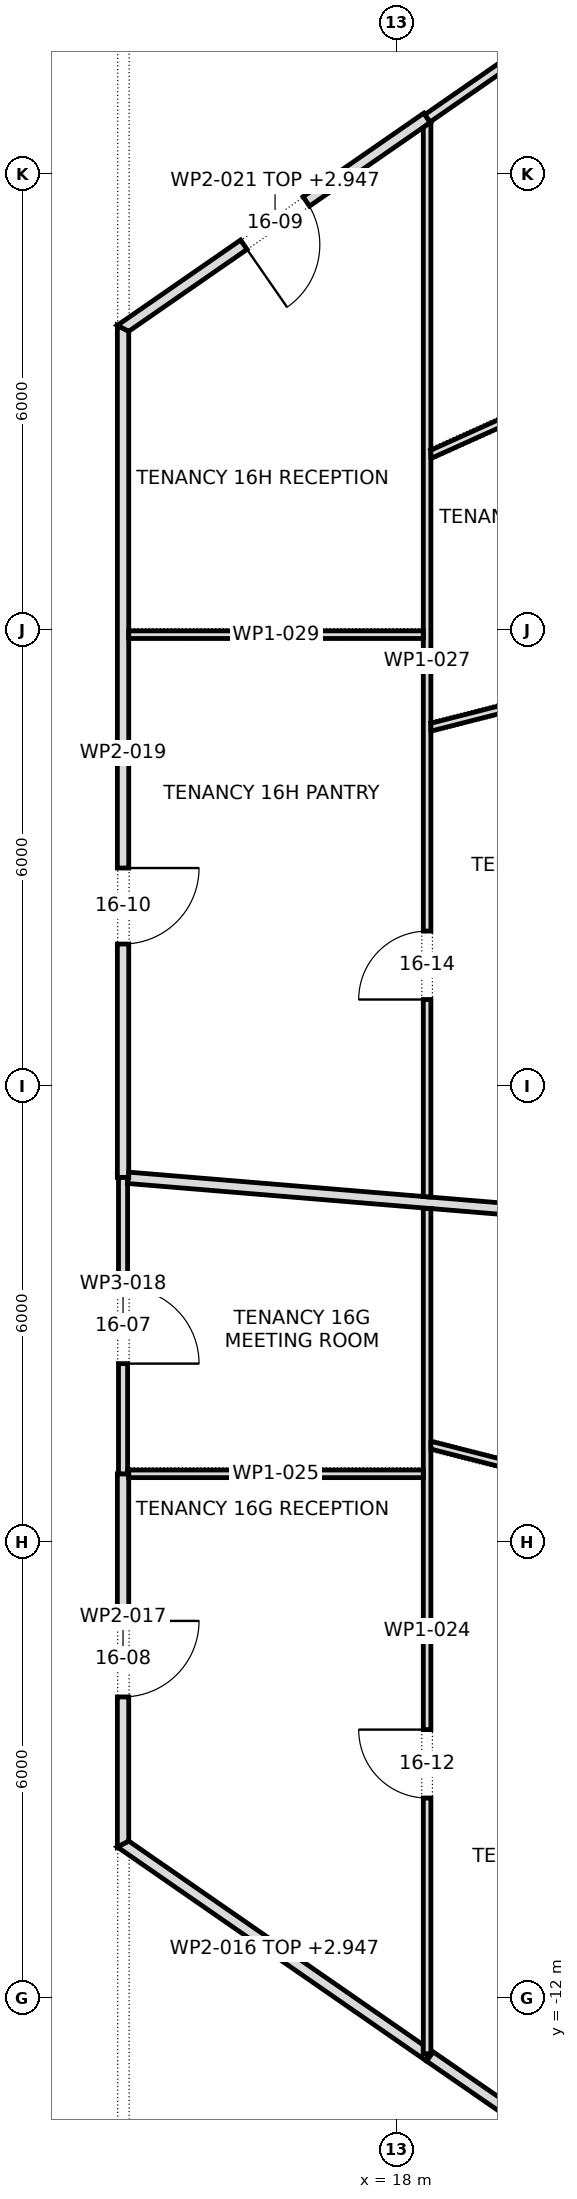
"""IFC4 building model, lengths in metres.
Left out: names, types, materials, properties, quantities, classifications, styles, units other than length and angle.
Written with IfcOpenShell. Run it as: python <this file> out.ifc"""

import sys

from ifc_helpers import new_model, si_unit, direction, frame, frame_2d, origin, place, context, subcontext, project, spatial, polyline, rectangle, outline, extrude, element, fill, save


model = new_model("IFC4")
c1 = context("Model", 3, precision=1e-05, world=origin(), true_north=direction((0.0, 1.0)))
c2 = subcontext(c1, "Body", "Model", "MODEL_VIEW")
j1 = project(units=[si_unit("LENGTHUNIT", "METRE"), si_unit("PLANEANGLEUNIT", "RADIAN")], contexts=[c1])
p1 = place(None, origin())
s1 = spatial("IfcSite", under=j1, at=p1, CompositionType="ELEMENT")
p2 = place(p1, origin())
s2 = spatial("IfcBuilding", under=s1, at=p2, CompositionType="ELEMENT")
p3 = place(p2, frame((0.0, 0.0, 226.9)))
s3 = spatial("IfcBuildingStorey", under=s2, at=p3, CompositionType="ELEMENT", Elevation=226.9)
p4 = place(p3, frame((14.368, -9.948, 0.0), z_axis=(0.0, 0.0, 1.0), x_axis=(0.822094305235, -0.569351344339, 0.0)))
e1 = element("IfcWall", 1, at=p4, inside=s3, PredefinedType="PARTITIONING", context=c2, shape_type="SweptSolid", body=[
    extrude(outline(polyline([(4.939, -0.075), (4.939, 0.036), (4.858, -0.02), (4.792, 0.075), (3.221, 0.075), (1.65, 0.075), (0.079, 0.075), (0.039, 0.0), (0.0, -0.075), (1.646, -0.075), (3.293, -0.075), (4.939, -0.075)])), origin(), (0.0, 0.0, 1.0), 2.947),
])
p5 = place(p3, frame((14.4, -5.1, 0.0), z_axis=(0.0, 0.0, 1.0), x_axis=(0.0, -1.0, 0.0)))
e2 = element("IfcWall", 2, at=p5, inside=s3, PredefinedType="PARTITIONING", context=c2, shape_type="SweptSolid", body=[
    extrude(outline(polyline([(4.909, -0.075), (4.909, -0.075), (4.831, 0.075), (3.22, 0.075), (1.61, 0.075), (0.0, 0.075), (0.0, -0.075), (1.636, -0.075), (3.273, -0.075), (4.909, -0.075)])), origin(), (0.0, 0.0, 1.0), 3.7),
])
p6 = place(p5, frame((1.935, 0.0, 0.0)))
e3 = element("IfcOpeningElement", 3, at=p6, cuts=e2, PredefinedType="OPENING", context=c2, shape_type="SweptSolid", body=[
    extrude(rectangle(XDim=1.0, YDim=2.1, at=frame_2d((0.5, 1.05))), frame((0.0, 0.087, 0.0), z_axis=(0.0, -1.0, 0.0), x_axis=(1.0, 0.0, 0.0)), (0.0, 0.0, 1.0), 0.174),
])
p7 = place(p3, frame((14.4, -1.2, 0.0), z_axis=(0.0, 0.0, 1.0), x_axis=(0.0, -1.0, 0.0)))
e4 = element("IfcWall", 4, at=p7, inside=s3, PredefinedType="PARTITIONING", context=c2, shape_type="SweptSolid", body=[
    extrude(rectangle(XDim=3.9, YDim=0.12, at=frame_2d((1.95, 0.0))), origin(), (0.0, 0.0, 1.0), 3.7),
])
p8 = place(p7, frame((1.45, 0.0, 0.0)))
e5 = element("IfcOpeningElement", 5, at=p8, cuts=e4, PredefinedType="OPENING", context=c2, shape_type="SweptSolid", body=[
    extrude(rectangle(XDim=1.0, YDim=2.1, at=frame_2d((0.5, 1.05))), frame((0.0, 0.072, 0.0), z_axis=(0.0, -1.0, 0.0), x_axis=(1.0, 0.0, 0.0)), (0.0, 0.0, 1.0), 0.144),
])
p9 = place(p3, frame((14.4, -1.2, 0.0), z_axis=(0.0, 0.0, 1.0), x_axis=(0.0, 1.0, 0.0)))
e6 = element("IfcWall", 6, at=p9, inside=s3, PredefinedType="PARTITIONING", context=c2, shape_type="SweptSolid", body=[
    extrude(outline(polyline([(0.0, -0.075), (1.855, -0.075), (3.71, -0.075), (5.565, -0.075), (7.42, -0.075), (9.276, -0.075), (11.131, -0.075), (11.209, 0.075), (11.209, 0.075), (9.341, 0.075), (7.473, 0.075), (5.604, 0.075), (3.736, 0.075), (1.868, 0.075), (0.0, 0.075), (0.0, -0.075)])), origin(), (0.0, 0.0, 1.0), 3.7),
])
p10 = place(p9, frame((3.07, 0.0, 0.0)))
e7 = element("IfcOpeningElement", 7, at=p10, cuts=e6, PredefinedType="OPENING", context=c2, shape_type="SweptSolid", body=[
    extrude(rectangle(XDim=1.0, YDim=2.1, at=frame_2d((0.5, 1.05))), frame((0.0, 0.087, 0.0), z_axis=(0.0, -1.0, 0.0), x_axis=(1.0, 0.0, 0.0)), (0.0, 0.0, 1.0), 0.174),
])
p11 = place(p3, frame((14.466, -1.206, 0.0), z_axis=(0.0, 0.0, 1.0), x_axis=(0.996598124583, -0.082414671491, 0.0)))
e8 = element("IfcWall", 8, at=p11, inside=s3, PredefinedType="PARTITIONING", context=c2, shape_type="SweptSolid", body=[
    extrude(outline(polyline([(0.0, -0.075), (1.334, -0.075), (2.667, -0.075), (4.001, -0.075), (4.003, -0.075), (4.003, -0.075), (5.7, -0.075), (7.397, -0.075), (9.094, -0.075), (10.791, -0.075), (12.488, -0.075), (14.185, -0.075), (14.19, -0.044), (14.19, 0.075), (12.475, 0.075), (10.761, 0.075), (9.046, 0.075), (7.332, 0.075), (5.617, 0.075), (3.903, 0.075), (3.891, 0.074), (3.891, 0.075), (1.947, 0.075), (0.002, 0.075), (0.008, 0.006), (0.0, 0.006), (0.0, -0.075)])), origin(), (0.0, 0.0, 1.0), 2.9),
])
p12 = place(p3, frame((14.368, 9.948, 0.0), z_axis=(0.0, 0.0, 1.0), x_axis=(0.822102584422, 0.56933938972, 0.0)))
e9 = element("IfcWall", 9, at=p12, inside=s3, PredefinedType="PARTITIONING", context=c2, shape_type="SweptSolid", body=[
    extrude(outline(polyline([(4.905, 0.075), (3.27, 0.075), (1.635, 0.075), (0.0, 0.075), (0.079, -0.075), (1.688, -0.075), (3.296, -0.075), (4.905, -0.075), (4.905, 0.075)])), origin(), (0.0, 0.0, 1.0), 2.947),
])
p13 = place(p12, frame((1.972, 0.0, 0.0)))
e10 = element("IfcOpeningElement", 10, at=p13, cuts=e9, PredefinedType="OPENING", context=c2, shape_type="SweptSolid", body=[
    extrude(rectangle(XDim=1.0, YDim=2.1, at=frame_2d((0.5, 1.05))), frame((0.0, 0.087, 0.0), z_axis=(0.0, -1.0, 0.0), x_axis=(1.0, 0.0, 0.0)), (0.0, 0.0, 1.0), 0.174),
])
p14 = place(p3, frame((18.428, -12.76, 0.0), z_axis=(0.0, 0.0, 1.0), x_axis=(0.822939262801, -0.568129360041, 0.0)))
e11 = element("IfcWall", 11, at=p14, inside=s3, PredefinedType="PARTITIONING", context=c2, shape_type="SweptSolid", body=[
    extrude(outline(polyline([(0.0, -0.075), (1.531, -0.075), (3.063, -0.075), (4.594, -0.075), (4.615, 0.0), (4.619, 0.068), (4.619, 0.075), (3.079, 0.075), (1.54, 0.075), (0.0, 0.075), (0.0, 0.038), (0.001, 0.037), (0.0, 0.036), (0.0, -0.075)])), origin(), (0.0, 0.0, 1.0), 3.7),
])
p15 = place(p3, frame((18.4, -12.73, 0.0), z_axis=(0.0, 0.0, 1.0), x_axis=(0.0, 1.0, 0.0)))
e12 = element("IfcWall", 12, at=p15, inside=s3, PredefinedType="PARTITIONING", context=c2, shape_type="SweptSolid", body=[
    extrude(rectangle(XDim=11.12, YDim=0.1, at=frame_2d((5.56, 0.0))), origin(), (0.0, 0.0, 1.0), 3.7),
])
p16 = place(p15, frame((3.365, 0.0, 0.0)))
e13 = element("IfcOpeningElement", 13, at=p16, cuts=e12, PredefinedType="OPENING", context=c2, shape_type="SweptSolid", body=[
    extrude(rectangle(XDim=0.9, YDim=2.1, at=frame_2d((0.45, 1.05))), frame((0.0, 0.062, 0.0), z_axis=(0.0, -1.0, 0.0), x_axis=(1.0, 0.0, 0.0)), (0.0, 0.0, 1.0), 0.124),
])
p17 = place(p3, frame((18.35, -5.1, 0.0), z_axis=(0.0, 0.0, 1.0), x_axis=(-1.0, 0.0, 0.0)))
e14 = element("IfcWall", 14, at=p17, inside=s3, PredefinedType="PARTITIONING", context=c2, shape_type="SweptSolid", body=[
    extrude(outline(polyline([(3.89, -0.05), (3.89, 0.0), (3.875, 0.0), (3.875, 0.05), (1.938, 0.05), (0.0, 0.05), (0.0, -0.05), (1.945, -0.05), (3.89, -0.05)])), origin(), (0.0, 0.0, 1.0), 3.7),
])
p18 = place(p3, frame((18.438, -4.719, 0.0), z_axis=(0.0, 0.0, 1.0), x_axis=(0.968975503795, -0.247156778269, 0.0)))
e15 = element("IfcWall", 15, at=p18, inside=s3, PredefinedType="PARTITIONING", context=c2, shape_type="SweptSolid", body=[
    extrude(outline(polyline([(0.025, -0.05), (1.892, -0.05), (3.759, -0.05), (5.625, -0.05), (7.492, -0.05), (9.358, -0.05), (9.367, -0.008), (9.367, 0.05), (7.494, 0.05), (5.62, 0.05), (3.747, 0.05), (1.874, 0.05), (0.0, 0.05), (0.0, 0.05), (0.025, -0.05)])), origin(), (0.0, 0.0, 1.0), 2.93),
])
p19 = place(p18, frame((4.367, 0.0, 0.0)))
e16 = element("IfcOpeningElement", 16, at=p19, cuts=e15, PredefinedType="OPENING", context=c2, shape_type="SweptSolid", body=[
    extrude(rectangle(XDim=0.9, YDim=2.1, at=frame_2d((0.45, 1.05))), frame((0.0, 0.062, 0.0), z_axis=(0.0, -1.0, 0.0), x_axis=(1.0, 0.0, 0.0)), (0.0, 0.0, 1.0), 0.124),
])
p20 = place(p3, frame((18.4, -1.459, 0.0), z_axis=(0.0, 0.0, 1.0), x_axis=(0.0, 1.0, 0.0)))
e17 = element("IfcWall", 17, at=p20, inside=s3, PredefinedType="PARTITIONING", context=c2, shape_type="SweptSolid", body=[
    extrude(outline(polyline([(0.0, -0.05), (1.557, -0.05), (3.113, -0.05), (4.67, -0.05), (6.227, -0.05), (6.233, -0.048), (6.234, -0.05), (8.027, -0.05), (9.821, -0.05), (9.826, -0.048), (9.827, -0.05), (11.268, -0.05), (12.709, -0.05), (14.151, -0.05), (14.151, -0.05), (14.145, -0.04), (14.151, -0.036), (14.151, -0.034), (14.138, -0.043), (14.073, 0.05), (12.417, 0.05), (10.761, 0.05), (9.105, 0.05), (7.449, 0.05), (7.449, 0.05), (7.349, 0.05), (7.349, 0.05), (5.514, 0.05), (3.679, 0.05), (1.844, 0.05), (0.008, 0.05), (0.0, -0.048), (0.0, -0.05)])), origin(), (0.0, 0.0, 1.0), 3.7),
])
p21 = place(p20, frame((2.6, 0.0, 0.0)))
e18 = element("IfcOpeningElement", 18, at=p21, cuts=e17, PredefinedType="OPENING", context=c2, shape_type="SweptSolid", body=[
    extrude(rectangle(XDim=0.9, YDim=2.1, at=frame_2d((0.45, 1.05))), frame((0.0, 0.062, 0.0), z_axis=(0.0, -1.0, 0.0), x_axis=(1.0, 0.0, 0.0)), (0.0, 0.0, 1.0), 0.124),
])
p22 = place(p3, frame((18.438, 4.719, 0.0), z_axis=(0.0, 0.0, 1.0), x_axis=(0.968975503795, 0.247156778269, 0.0)))
e19 = element("IfcWall", 19, at=p22, inside=s3, PredefinedType="PARTITIONING", context=c2, shape_type="SweptSolid", body=[
    extrude(outline(polyline([(9.367, -0.05), (9.367, 0.008), (9.358, 0.05), (7.492, 0.05), (5.625, 0.05), (3.759, 0.05), (1.892, 0.05), (0.025, 0.05), (0.0, -0.05), (0.0, -0.05), (1.874, -0.05), (3.747, -0.05), (5.62, -0.05), (7.494, -0.05), (9.367, -0.05)])), origin(), (0.0, 0.0, 1.0), 2.93),
])
p23 = place(p22, frame((4.367, 0.0, 0.0)))
e20 = element("IfcOpeningElement", 20, at=p23, cuts=e19, PredefinedType="OPENING", context=c2, shape_type="SweptSolid", body=[
    extrude(rectangle(XDim=0.9, YDim=2.1, at=frame_2d((0.45, 1.05))), frame((0.0, 0.062, 0.0), z_axis=(0.0, -1.0, 0.0), x_axis=(1.0, 0.0, 0.0)), (0.0, 0.0, 1.0), 0.124),
])
p24 = place(p3, frame((18.35, 5.94, 0.0), z_axis=(0.0, 0.0, 1.0), x_axis=(-1.0, 0.0, 0.0)))
e21 = element("IfcWall", 21, at=p24, inside=s3, PredefinedType="PARTITIONING", context=c2, shape_type="SweptSolid", body=[
    extrude(rectangle(XDim=3.875, YDim=0.1, at=frame_2d((1.938, 0.0))), origin(), (0.0, 0.0, 1.0), 3.7),
])
p25 = place(p3, frame((18.43, 8.303, 0.0), z_axis=(0.0, 0.0, 1.0), x_axis=(0.911623805038, 0.411025592985, 0.0)))
e22 = element("IfcWall", 22, at=p25, inside=s3, PredefinedType="PARTITIONING", context=c2, shape_type="SweptSolid", body=[
    extrude(outline(polyline([(7.602, -0.05), (7.602, -0.045), (7.6, 0.002), (7.588, 0.05), (5.702, 0.05), (3.816, 0.05), (1.931, 0.05), (0.045, 0.05), (0.0, -0.049), (0.0, -0.05), (1.9, -0.05), (3.801, -0.05), (5.701, -0.05), (7.602, -0.05)])), origin(), (0.0, 0.0, 1.0), 2.947),
])
p26 = place(p25, frame((3.483, 0.0, 0.0)))
e23 = element("IfcOpeningElement", 23, at=p26, cuts=e22, PredefinedType="OPENING", context=c2, shape_type="SweptSolid", body=[
    extrude(rectangle(XDim=0.9, YDim=2.1, at=frame_2d((0.45, 1.05))), frame((0.0, 0.062, 0.0), z_axis=(0.0, -1.0, 0.0), x_axis=(1.0, 0.0, 0.0)), (0.0, 0.0, 1.0), 0.124),
])
p27 = place(p3, frame((18.405, 12.733, 0.0), z_axis=(0.0, 0.0, 1.0), x_axis=(0.821978662859, 0.569518285751, 0.0)))
e24 = element("IfcWall", 24, at=p27, inside=s3, PredefinedType="PARTITIONING", context=c2, shape_type="SweptSolid", body=[
    extrude(outline(polyline([(4.652, -0.06), (4.652, -0.055), (4.649, 0.0), (4.633, 0.06), (3.088, 0.06), (1.544, 0.06), (0.0, 0.06), (0.0, -0.051), (0.013, -0.06), (1.56, -0.06), (3.106, -0.06), (4.652, -0.06)])), origin(), (0.0, 0.0, 1.0), 3.7),
])
p28 = place(p8, origin())
e25 = element("IfcDoor", 25, at=p28, inside=s3, OperationType="SINGLE_SWING_LEFT", PredefinedType="DOOR", context=c2, shape_type="SweptSolid", body=[
    extrude(rectangle(XDim=1.0, YDim=2.1, at=frame_2d((0.5, 1.05))), frame((0.0, 0.025, 0.0), z_axis=(0.0, -1.0, 0.0), x_axis=(1.0, 0.0, 0.0)), (0.0, 0.0, 1.0), 0.05),
])
fill(e5, e25)
p29 = place(p6, origin())
e26 = element("IfcDoor", 26, at=p29, inside=s3, OperationType="SINGLE_SWING_RIGHT", PredefinedType="DOOR", context=c2, shape_type="SweptSolid", body=[
    extrude(rectangle(XDim=1.0, YDim=2.1, at=frame_2d((0.5, 1.05))), frame((0.0, 0.025, 0.0), z_axis=(0.0, -1.0, 0.0), x_axis=(1.0, 0.0, 0.0)), (0.0, 0.0, 1.0), 0.05),
])
fill(e3, e26)
p30 = place(p13, frame((1.0, 0.0, 0.0), z_axis=(0.0, 0.0, 1.0), x_axis=(-1.0, 0.0, 0.0)))
e27 = element("IfcDoor", 27, at=p30, inside=s3, OperationType="SINGLE_SWING_LEFT", PredefinedType="DOOR", context=c2, shape_type="SweptSolid", body=[
    extrude(rectangle(XDim=1.0, YDim=2.1, at=frame_2d((0.5, 1.05))), frame((0.0, 0.025, 0.0), z_axis=(0.0, -1.0, 0.0), x_axis=(1.0, 0.0, 0.0)), (0.0, 0.0, 1.0), 0.05),
])
fill(e10, e27)
p31 = place(p10, frame((1.0, 0.0, 0.0), z_axis=(0.0, 0.0, 1.0), x_axis=(-1.0, 0.0, 0.0)))
e28 = element("IfcDoor", 28, at=p31, inside=s3, OperationType="SINGLE_SWING_RIGHT", PredefinedType="DOOR", context=c2, shape_type="SweptSolid", body=[
    extrude(rectangle(XDim=1.0, YDim=2.1, at=frame_2d((0.5, 1.05))), frame((0.0, 0.025, 0.0), z_axis=(0.0, -1.0, 0.0), x_axis=(1.0, 0.0, 0.0)), (0.0, 0.0, 1.0), 0.05),
])
fill(e7, e28)
p32 = place(p16, origin())
e29 = element("IfcDoor", 29, at=p32, inside=s3, OperationType="SINGLE_SWING_LEFT", PredefinedType="DOOR", context=c2, shape_type="SweptSolid", body=[
    extrude(rectangle(XDim=0.9, YDim=2.1, at=frame_2d((0.45, 1.05))), frame((0.0, 0.025, 0.0), z_axis=(0.0, -1.0, 0.0), x_axis=(1.0, 0.0, 0.0)), (0.0, 0.0, 1.0), 0.05),
])
fill(e13, e29)
p33 = place(p21, origin())
e30 = element("IfcDoor", 30, at=p33, inside=s3, OperationType="SINGLE_SWING_RIGHT", PredefinedType="DOOR", context=c2, shape_type="SweptSolid", body=[
    extrude(rectangle(XDim=0.9, YDim=2.1, at=frame_2d((0.45, 1.05))), frame((0.0, 0.025, 0.0), z_axis=(0.0, -1.0, 0.0), x_axis=(1.0, 0.0, 0.0)), (0.0, 0.0, 1.0), 0.05),
])
fill(e18, e30)
save(model, sys.argv[1])
